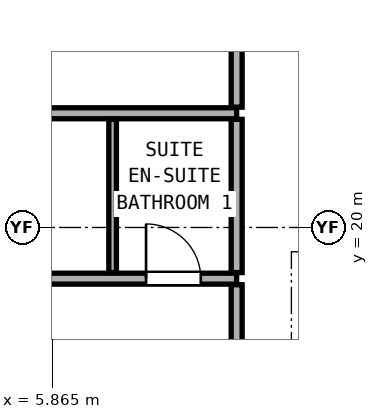
"""IFC4 building model, lengths in metres.
Left out: names, types, materials, properties, quantities, classifications, styles, units other than length and angle.
Written with IfcOpenShell. Run it as: python <this file> out.ifc"""

import sys

from ifc_helpers import new_model, si_unit, direction, frame, frame_2d, origin, place, context, subcontext, project, spatial, rectangle, extrude, element, fill, save


model = new_model("IFC4")
c1 = context("Model", 3, precision=1e-05, world=origin(), true_north=direction((0.0, 1.0)))
c2 = subcontext(c1, "Body", "Model", "MODEL_VIEW")
j1 = project(units=[si_unit("LENGTHUNIT", "METRE"), si_unit("PLANEANGLEUNIT", "RADIAN")], contexts=[c1])
p1 = place(None, origin())
s1 = spatial("IfcSite", under=j1, at=p1, CompositionType="ELEMENT")
p2 = place(p1, origin())
s2 = spatial("IfcBuilding", under=s1, at=p2, CompositionType="ELEMENT")
p3 = place(p2, frame((0.0, 0.0, 104.9)))
s3 = spatial("IfcBuildingStorey", under=s2, at=p3, CompositionType="ELEMENT", Elevation=104.9)
p4 = place(p3, frame((-1.13, 19.158, 0.0), z_axis=(0.0, 0.0, 1.0), x_axis=(1.0, 0.0, 0.0)))
e1 = element("IfcWall", 1, at=p4, inside=s3, PredefinedType="PARTITIONING", context=c2, shape_type="SweptSolid", body=[
    extrude(rectangle(XDim=10.03, YDim=0.18, at=frame_2d((5.015, 0.0))), origin(), (0.0, 0.0, 1.0), 2.145),
])
p5 = place(p4, frame((4.19, 0.0, 0.0)))
e2 = element("IfcOpeningElement", 2, at=p5, cuts=e1, PredefinedType="OPENING", context=c2, shape_type="SweptSolid", body=[
    extrude(rectangle(XDim=0.85, YDim=2.01, at=frame_2d((0.425, 1.005))), frame((0.0, 0.1, 0.0), z_axis=(0.0, -1.0, 0.0), x_axis=(1.0, 0.0, 0.0)), (0.0, 0.0, 1.0), 0.2),
])
p6 = place(p4, frame((8.54, 0.0, 0.0)))
e3 = element("IfcOpeningElement", 3, at=p6, cuts=e1, PredefinedType="OPENING", context=c2, shape_type="SweptSolid", body=[
    extrude(rectangle(XDim=0.9, YDim=2.1, at=frame_2d((0.45, 1.05))), frame((0.0, 0.1, 0.0), z_axis=(0.0, -1.0, 0.0), x_axis=(1.0, 0.0, 0.0)), (0.0, 0.0, 1.0), 0.2),
])
p7 = place(p3, frame((-1.13, 21.878, 0.0), z_axis=(0.0, 0.0, 1.0), x_axis=(1.0, 0.0, 0.0)))
e4 = element("IfcWall", 4, at=p7, inside=s3, PredefinedType="PARTITIONING", context=c2, shape_type="SweptSolid", body=[
    extrude(rectangle(XDim=10.03, YDim=0.18, at=frame_2d((5.015, 0.0))), origin(), (0.0, 0.0, 1.0), 2.145),
])
p8 = place(p3, frame((6.86, 19.258, 0.0), z_axis=(0.0, 0.0, 1.0), x_axis=(0.0, 1.0, 0.0)))
e5 = element("IfcWall", 5, at=p8, inside=s3, PredefinedType="PARTITIONING", context=c2, shape_type="SweptSolid", body=[
    extrude(rectangle(XDim=2.52, YDim=0.125, at=frame_2d((1.26, 0.0))), origin(), (0.0, 0.0, 1.0), 3.08),
])
p9 = place(p3, frame((8.9, 14.385, 0.0), z_axis=(0.0, 0.0, 1.0), x_axis=(0.0, 1.0, 0.0)))
e6 = element("IfcWall", 6, at=p9, inside=s3, PredefinedType="PARTITIONING", context=c2, shape_type="SweptSolid", body=[
    extrude(rectangle(XDim=4.673, YDim=0.18, at=frame_2d((2.336, 0.0))), origin(), (0.0, 0.0, 1.0), 2.456),
])
p10 = place(p9, frame((2.412, 0.0, 0.0)))
e7 = element("IfcOpeningElement", 7, at=p10, cuts=e6, PredefinedType="OPENING", context=c2, shape_type="SweptSolid", body=[
    extrude(rectangle(XDim=1.05, YDim=2.2, at=frame_2d((0.525, 1.1))), frame((0.0, 0.1, 0.0), z_axis=(0.0, -1.0, 0.0), x_axis=(1.0, 0.0, 0.0)), (0.0, 0.0, 1.0), 0.2),
])
p11 = place(p3, frame((8.9, 19.258, 0.0), z_axis=(0.0, 0.0, 1.0), x_axis=(0.0, 1.0, 0.0)))
e8 = element("IfcWall", 8, at=p11, inside=s3, PredefinedType="PARTITIONING", context=c2, shape_type="SweptSolid", body=[
    extrude(rectangle(XDim=2.52, YDim=0.18, at=frame_2d((1.26, 0.0))), origin(), (0.0, 0.0, 1.0), 3.08),
])
p12 = place(p3, frame((8.9, 21.978, 0.0), z_axis=(0.0, 0.0, 1.0), x_axis=(0.0, 1.0, 0.0)))
e9 = element("IfcWall", 9, at=p12, inside=s3, PredefinedType="PARTITIONING", context=c2, shape_type="SweptSolid", body=[
    extrude(rectangle(XDim=3.146, YDim=0.18, at=frame_2d((1.573, 0.0))), origin(), (0.0, 0.0, 1.0), 2.299),
])
p13 = place(p12, frame((1.048, 0.0, 0.0)))
e10 = element("IfcOpeningElement", 10, at=p13, cuts=e9, PredefinedType="OPENING", context=c2, shape_type="SweptSolid", body=[
    extrude(rectangle(XDim=1.05, YDim=2.2, at=frame_2d((0.525, 1.1))), frame((0.0, 0.1, 0.0), z_axis=(0.0, -1.0, 0.0), x_axis=(1.0, 0.0, 0.0)), (0.0, 0.0, 1.0), 0.2),
])
p14 = place(p6, origin())
e11 = element("IfcDoor", 11, at=p14, inside=s3, OperationType="SINGLE_SWING_LEFT", PredefinedType="DOOR", context=c2, shape_type="SweptSolid", body=[
    extrude(rectangle(XDim=0.9, YDim=2.1, at=frame_2d((0.45, 1.05))), frame((0.0, 0.025, 0.0), z_axis=(0.0, -1.0, 0.0), x_axis=(1.0, 0.0, 0.0)), (0.0, 0.0, 1.0), 0.05),
])
fill(e3, e11)
save(model, sys.argv[1])
